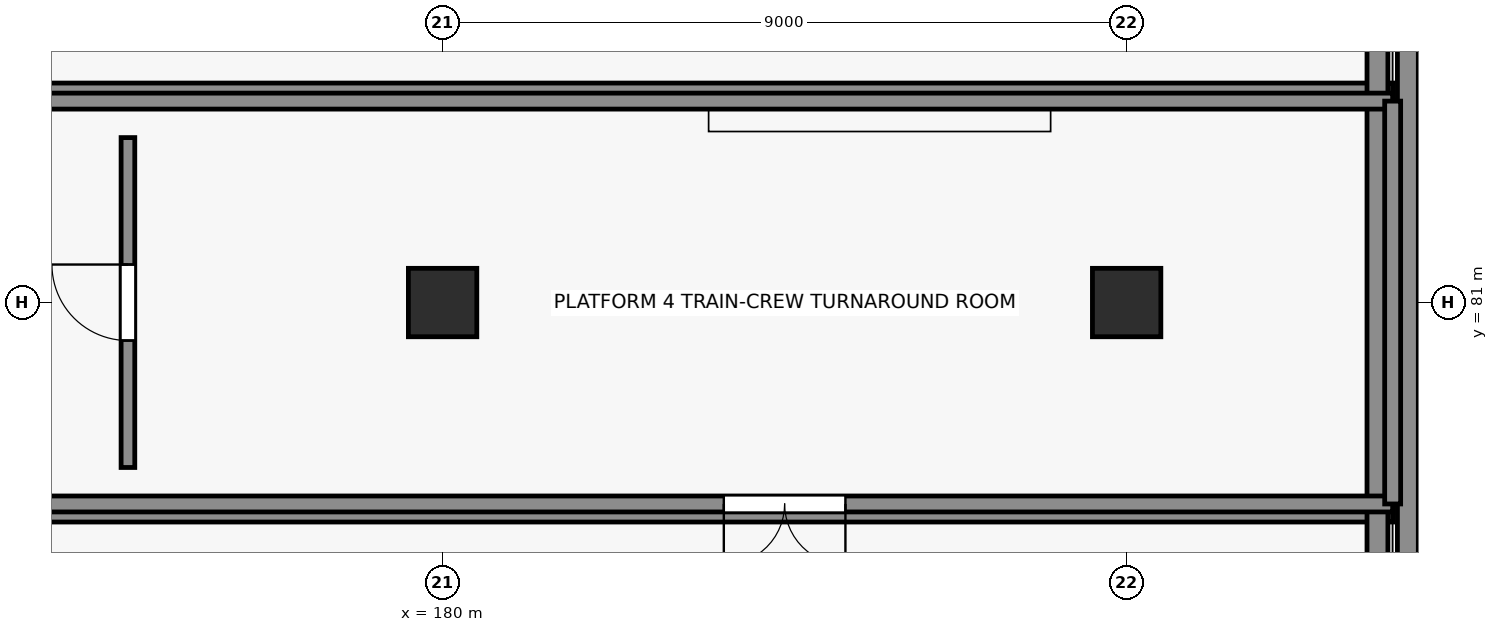
"""IFC4 building model, lengths in metres.
Left out: names, types, materials, properties, quantities, classifications, styles, units other than length and angle.
Written with IfcOpenShell. Run it as: python <this file> out.ifc"""

import sys

from ifc_helpers import new_model, si_unit, direction, frame, frame_2d, origin, origin_2d, place, context, subcontext, project, spatial, rectangle, extrude, element, fill, save


model = new_model("IFC4")
c1 = context("Model", 3, precision=1e-05, world=origin(), true_north=direction((0.0, 1.0)))
c2 = subcontext(c1, "Body", "Model", "MODEL_VIEW")
j1 = project(units=[si_unit("LENGTHUNIT", "METRE"), si_unit("PLANEANGLEUNIT", "RADIAN")], contexts=[c1])
p1 = place(None, origin())
s1 = spatial("IfcSite", under=j1, at=p1, CompositionType="ELEMENT")
p2 = place(p1, origin())
s2 = spatial("IfcBuilding", under=s1, at=p2, CompositionType="ELEMENT")
p3 = place(p2, origin())
s3 = spatial("IfcBuildingStorey", under=s2, at=p3, CompositionType="ELEMENT", Elevation=0.0)
for number, where, z_axis, x_axis in (
    (1, (141.5, 78.25, 0.0), (0.0, 0.0, 1.0), (1.0, 0.0, 0.0)),
    (2, (141.5, 83.75, 0.0), (0.0, 0.0, 1.0), (1.0, 0.0, 0.0)),
):
    element("IfcWall", number, at=place(p3, frame(where, z_axis=z_axis, x_axis=x_axis)), inside=s3, PredefinedType="SOLIDWALL", context=c2, shape_type="SweptSolid", body=[
        extrude(rectangle(XDim=51.0, YDim=0.275, at=frame_2d((25.5, 0.0))), origin(), (0.0, 0.0, 1.0), 0.675),
    ])
for number, where, z_axis, x_axis in (
    (3, (192.3, 77.25, 0.0), (0.0, 0.0, 1.0), (0.0, 1.0, 0.0)),
    (4, (192.7, 77.25, 0.0), (0.0, 0.0, 1.0), (0.0, 1.0, 0.0)),
):
    element("IfcWall", number, at=place(p3, frame(where, z_axis=z_axis, x_axis=x_axis)), inside=s3, PredefinedType="SOLIDWALL", context=c2, shape_type="SweptSolid", body=[
        extrude(rectangle(XDim=7.5, YDim=0.275, at=frame_2d((3.75, 0.0))), origin(), (0.0, 0.0, 1.0), 0.675),
    ])
for number, where, z_axis, x_axis in (
    (5, (180.0, 81.0, 0.0), (0.0, 0.0, 1.0), (1.0, 0.0, 0.0)),
    (6, (189.0, 81.0, 0.0), (0.0, 0.0, 1.0), (1.0, 0.0, 0.0)),
):
    element("IfcColumn", number, at=place(p3, frame(where, z_axis=z_axis, x_axis=x_axis)), inside=s3, PredefinedType="COLUMN", context=c2, shape_type="SweptSolid", body=[
        extrude(rectangle(XDim=0.9, YDim=0.9, at=origin_2d()), origin(), (0.0, 0.0, 1.0), 4.8),
    ])
p4 = place(p3, frame((192.5, 78.35, 0.915), z_axis=(0.0, 0.0, 1.0), x_axis=(-1.0, 0.0, 0.0)))
e7 = element("IfcWall", 7, at=p4, inside=s3, PredefinedType="SOLIDWALL", context=c2, shape_type="SweptSolid", body=[
    extrude(rectangle(XDim=51.0, YDim=0.21, at=frame_2d((25.5, 0.0))), origin(), (0.0, 0.0, 1.0), 3.185),
])
p5 = place(p4, frame((25.2, 0.0, 0.0)))
e8 = element("IfcOpeningElement", 8, at=p5, cuts=e7, PredefinedType="OPENING", context=c2, shape_type="SweptSolid", body=[
    extrude(rectangle(XDim=1.6, YDim=2.3, at=frame_2d((0.8, 1.15))), frame((0.0, 0.115, 0.0), z_axis=(0.0, -1.0, 0.0), x_axis=(1.0, 0.0, 0.0)), (0.0, 0.0, 1.0), 0.23),
])
p6 = place(p4, frame((7.2, 0.0, 0.0)))
e9 = element("IfcOpeningElement", 9, at=p6, cuts=e7, PredefinedType="OPENING", context=c2, shape_type="SweptSolid", body=[
    extrude(rectangle(XDim=1.6, YDim=2.3, at=frame_2d((0.8, 1.15))), frame((0.0, 0.115, 0.0), z_axis=(0.0, -1.0, 0.0), x_axis=(1.0, 0.0, 0.0)), (0.0, 0.0, 1.0), 0.23),
])
p7 = place(p4, frame((36.0, 0.0, 0.9)))
e10 = element("IfcOpeningElement", 10, at=p7, cuts=e7, PredefinedType="OPENING", context=c2, shape_type="SweptSolid", body=[
    extrude(rectangle(XDim=4.2, YDim=1.5, at=frame_2d((2.1, 0.75))), frame((0.0, 0.115, 0.0), z_axis=(0.0, -1.0, 0.0), x_axis=(1.0, 0.0, 0.0)), (0.0, 0.0, 1.0), 0.23),
])
p8 = place(p3, frame((141.5, 83.65, 0.915), z_axis=(0.0, 0.0, 1.0), x_axis=(1.0, 0.0, 0.0)))
e11 = element("IfcWall", 11, at=p8, inside=s3, PredefinedType="SOLIDWALL", context=c2, shape_type="SweptSolid", body=[
    extrude(rectangle(XDim=51.0, YDim=0.21, at=frame_2d((25.5, 0.0))), origin(), (0.0, 0.0, 1.0), 3.185),
])
p9 = place(p8, frame((15.2, 0.0, 0.0)))
e12 = element("IfcOpeningElement", 12, at=p9, cuts=e11, PredefinedType="OPENING", context=c2, shape_type="SweptSolid", body=[
    extrude(rectangle(XDim=1.6, YDim=2.3, at=frame_2d((0.8, 1.15))), frame((0.0, 0.115, 0.0), z_axis=(0.0, -1.0, 0.0), x_axis=(1.0, 0.0, 0.0)), (0.0, 0.0, 1.0), 0.23),
])
p10 = place(p8, frame((24.0, 0.0, 0.9)))
e13 = element("IfcOpeningElement", 13, at=p10, cuts=e11, PredefinedType="OPENING", context=c2, shape_type="SweptSolid", body=[
    extrude(rectangle(XDim=4.2, YDim=1.5, at=frame_2d((2.1, 0.75))), frame((0.0, 0.115, 0.0), z_axis=(0.0, -1.0, 0.0), x_axis=(1.0, 0.0, 0.0)), (0.0, 0.0, 1.0), 0.23),
])
p11 = place(p3, frame((192.5, 83.65, 0.915), z_axis=(0.0, 0.0, 1.0), x_axis=(0.0, -1.0, 0.0)))
e14 = element("IfcWall", 14, at=p11, inside=s3, PredefinedType="SOLIDWALL", context=c2, shape_type="SweptSolid", body=[
    extrude(rectangle(XDim=5.3, YDim=0.21, at=frame_2d((2.65, 0.0))), origin(), (0.0, 0.0, 1.0), 3.185),
])
p12 = place(p3, frame((175.86, 78.83, 0.915), z_axis=(0.0, 0.0, 1.0), x_axis=(0.0, 1.0, 0.0)))
e15 = element("IfcWall", 15, at=p12, inside=s3, PredefinedType="PARTITIONING", context=c2, shape_type="SweptSolid", body=[
    extrude(rectangle(XDim=4.34, YDim=0.18, at=frame_2d((2.17, 0.0))), origin(), (0.0, 0.0, 1.0), 3.435),
])
p13 = place(p12, frame((1.67, 0.0, 0.0)))
e16 = element("IfcOpeningElement", 16, at=p13, cuts=e15, PredefinedType="OPENING", context=c2, shape_type="SweptSolid", body=[
    extrude(rectangle(XDim=1.0, YDim=2.15, at=frame_2d((0.5, 1.075))), frame((0.0, 0.1, 0.0), z_axis=(0.0, -1.0, 0.0), x_axis=(1.0, 0.0, 0.0)), (0.0, 0.0, 1.0), 0.2),
])
p14 = place(p6, origin())
e17 = element("IfcDoor", 17, at=p14, inside=s3, OperationType="DOUBLE_DOOR_SINGLE_SWING", PredefinedType="DOOR", context=c2, shape_type="SweptSolid", body=[
    extrude(rectangle(XDim=1.6, YDim=2.3, at=frame_2d((0.8, 1.15))), frame((0.0, 0.025, 0.0), z_axis=(0.0, -1.0, 0.0), x_axis=(1.0, 0.0, 0.0)), (0.0, 0.0, 1.0), 0.05),
])
fill(e9, e17)
p15 = place(p13, origin())
e18 = element("IfcDoor", 18, at=p15, inside=s3, OperationType="SINGLE_SWING_RIGHT", PredefinedType="DOOR", context=c2, shape_type="SweptSolid", body=[
    extrude(rectangle(XDim=1.0, YDim=2.15, at=frame_2d((0.5, 1.075))), frame((0.0, 0.025, 0.0), z_axis=(0.0, -1.0, 0.0), x_axis=(1.0, 0.0, 0.0)), (0.0, 0.0, 1.0), 0.05),
])
fill(e16, e18)
save(model, sys.argv[1])
